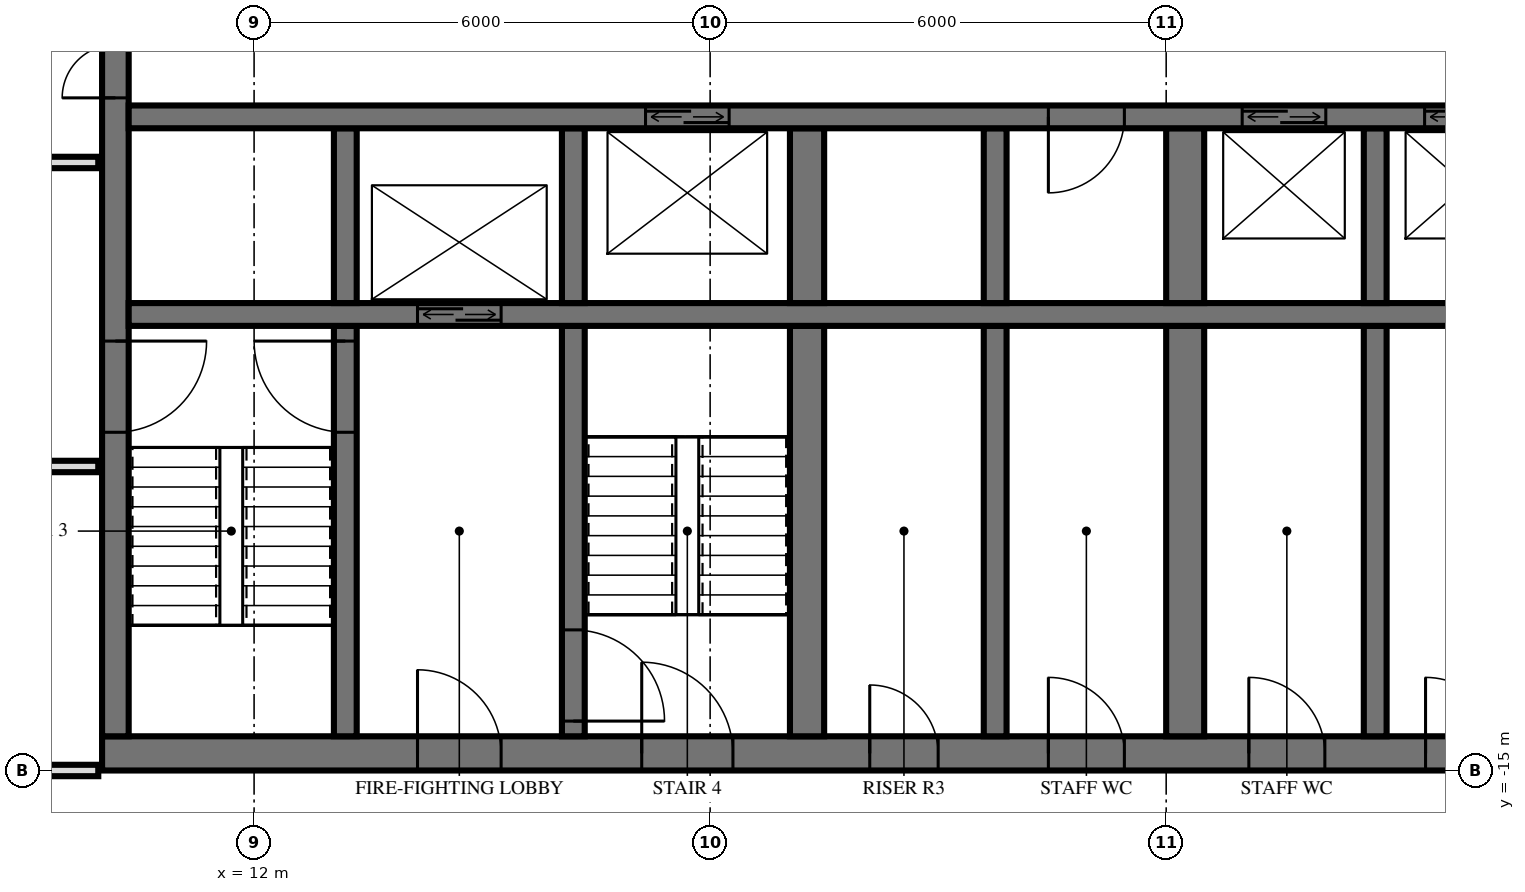
"""IFC4 building model, lengths in metres.
Left out: names, types, materials, properties, quantities, classifications, styles, units other than length and angle.
Written with IfcOpenShell. Run it as: python <this file> out.ifc"""

import sys

from ifc_helpers import new_model, si_unit, direction, frame, frame_2d, origin, place, context, subcontext, project, spatial, rectangle, extrude, element, fill, save


model = new_model("IFC4")
c1 = context("Model", 3, precision=1e-05, world=origin(), true_north=direction((0.0, 1.0)))
c2 = subcontext(c1, "Body", "Model", "MODEL_VIEW")
j1 = project(units=[si_unit("LENGTHUNIT", "METRE"), si_unit("PLANEANGLEUNIT", "RADIAN")], contexts=[c1])
p1 = place(None, origin())
s1 = spatial("IfcSite", under=j1, at=p1, CompositionType="ELEMENT")
p2 = place(p1, origin())
s2 = spatial("IfcBuilding", under=s1, at=p2, CompositionType="ELEMENT")
p3 = place(p2, frame((0.0, 0.0, 99.6)))
s3 = spatial("IfcBuildingStorey", under=s2, at=p3, CompositionType="ELEMENT", Elevation=99.6)
p4 = place(p3, frame((10.0, -14.775, 0.0), z_axis=(0.0, 0.0, 1.0), x_axis=(1.0, 0.0, 0.0)))
e1 = element("IfcWall", 1, at=p4, inside=s3, PredefinedType="SHEAR", context=c2, shape_type="SweptSolid", body=[
    extrude(rectangle(XDim=19.5, YDim=0.45, at=frame_2d((9.75, 0.0))), origin(), (0.0, 0.0, 1.0), 3.6),
])
p5 = place(p4, frame((7.1, 0.0, 0.0)))
e2 = element("IfcOpeningElement", 2, at=p5, cuts=e1, PredefinedType="OPENING", context=c2, shape_type="SweptSolid", body=[
    extrude(rectangle(XDim=1.2, YDim=2.1, at=frame_2d((0.6, 1.05))), frame((0.0, 0.235, 0.0), z_axis=(0.0, -1.0, 0.0), x_axis=(1.0, 0.0, 0.0)), (0.0, 0.0, 1.0), 0.47),
])
p6 = place(p4, frame((4.15, 0.0, 0.0)))
e3 = element("IfcOpeningElement", 3, at=p6, cuts=e1, PredefinedType="OPENING", context=c2, shape_type="SweptSolid", body=[
    extrude(rectangle(XDim=1.1, YDim=2.1, at=frame_2d((0.55, 1.05))), frame((0.0, 0.235, 0.0), z_axis=(0.0, -1.0, 0.0), x_axis=(1.0, 0.0, 0.0)), (0.0, 0.0, 1.0), 0.47),
])
p7 = place(p4, frame((10.1, 0.0, 0.0)))
e4 = element("IfcOpeningElement", 4, at=p7, cuts=e1, PredefinedType="OPENING", context=c2, shape_type="SweptSolid", body=[
    extrude(rectangle(XDim=0.9, YDim=2.1, at=frame_2d((0.45, 1.05))), frame((0.0, 0.235, 0.0), z_axis=(0.0, -1.0, 0.0), x_axis=(1.0, 0.0, 0.0)), (0.0, 0.0, 1.0), 0.47),
])
p8 = place(p4, frame((12.45, 0.0, 0.0)))
e5 = element("IfcOpeningElement", 5, at=p8, cuts=e1, PredefinedType="OPENING", context=c2, shape_type="SweptSolid", body=[
    extrude(rectangle(XDim=1.0, YDim=2.1, at=frame_2d((0.5, 1.05))), frame((0.0, 0.235, 0.0), z_axis=(0.0, -1.0, 0.0), x_axis=(1.0, 0.0, 0.0)), (0.0, 0.0, 1.0), 0.47),
])
p9 = place(p4, frame((15.087, 0.0, 0.0)))
e6 = element("IfcOpeningElement", 6, at=p9, cuts=e1, PredefinedType="OPENING", context=c2, shape_type="SweptSolid", body=[
    extrude(rectangle(XDim=1.0, YDim=2.1, at=frame_2d((0.5, 1.05))), frame((0.0, 0.235, 0.0), z_axis=(0.0, -1.0, 0.0), x_axis=(1.0, 0.0, 0.0)), (0.0, 0.0, 1.0), 0.47),
])
p10 = place(p4, frame((17.413, 0.0, 0.0)))
e7 = element("IfcOpeningElement", 7, at=p10, cuts=e1, PredefinedType="OPENING", context=c2, shape_type="SweptSolid", body=[
    extrude(rectangle(XDim=1.0, YDim=2.1, at=frame_2d((0.5, 1.05))), frame((0.0, 0.235, 0.0), z_axis=(0.0, -1.0, 0.0), x_axis=(1.0, 0.0, 0.0)), (0.0, 0.0, 1.0), 0.47),
])
p11 = place(p3, frame((10.175, -14.55, 0.0), z_axis=(0.0, 0.0, 1.0), x_axis=(0.0, 1.0, 0.0)))
e8 = element("IfcWall", 8, at=p11, inside=s3, PredefinedType="SHEAR", context=c2, shape_type="SweptSolid", body=[
    extrude(rectangle(XDim=14.1, YDim=0.35, at=frame_2d((7.05, 0.0))), origin(), (0.0, 0.0, 1.0), 3.6),
])
p12 = place(p11, frame((8.4, 0.0, 0.0)))
e9 = element("IfcOpeningElement", 9, at=p12, cuts=e8, PredefinedType="OPENING", context=c2, shape_type="SweptSolid", body=[
    extrude(rectangle(XDim=1.4, YDim=2.4, at=frame_2d((0.7, 1.2))), frame((0.0, 0.185, 0.0), z_axis=(0.0, -1.0, 0.0), x_axis=(1.0, 0.0, 0.0)), (0.0, 0.0, 1.0), 0.37),
])
p13 = place(p11, frame((10.0, 0.0, 0.0)))
e10 = element("IfcOpeningElement", 10, at=p13, cuts=e8, PredefinedType="OPENING", context=c2, shape_type="SweptSolid", body=[
    extrude(rectangle(XDim=1.4, YDim=2.4, at=frame_2d((0.7, 1.2))), frame((0.0, 0.185, 0.0), z_axis=(0.0, -1.0, 0.0), x_axis=(1.0, 0.0, 0.0)), (0.0, 0.0, 1.0), 0.37),
])
p14 = place(p11, frame((4.0, 0.0, 0.0)))
e11 = element("IfcOpeningElement", 11, at=p14, cuts=e8, PredefinedType="OPENING", context=c2, shape_type="SweptSolid", body=[
    extrude(rectangle(XDim=1.2, YDim=2.1, at=frame_2d((0.6, 1.05))), frame((0.0, 0.185, 0.0), z_axis=(0.0, -1.0, 0.0), x_axis=(1.0, 0.0, 0.0)), (0.0, 0.0, 1.0), 0.37),
])
p15 = place(p3, frame((10.35, -6.4, 0.0), z_axis=(0.0, 0.0, 1.0), x_axis=(1.0, 0.0, 0.0)))
e12 = element("IfcWall", 12, at=p15, inside=s3, PredefinedType="SHEAR", context=c2, shape_type="SweptSolid", body=[
    extrude(rectangle(XDim=18.7, YDim=0.3, at=frame_2d((9.35, 0.0))), origin(), (0.0, 0.0, 1.0), 3.6),
])
p16 = place(p15, frame((14.65, 0.0, 0.0)))
e13 = element("IfcOpeningElement", 13, at=p16, cuts=e12, PredefinedType="OPENING", context=c2, shape_type="SweptSolid", body=[
    extrude(rectangle(XDim=1.1, YDim=2.1, at=frame_2d((0.55, 1.05))), frame((0.0, 0.16, 0.0), z_axis=(0.0, -1.0, 0.0), x_axis=(1.0, 0.0, 0.0)), (0.0, 0.0, 1.0), 0.32),
])
p17 = place(p15, frame((17.05, 0.0, 0.0)))
e14 = element("IfcOpeningElement", 14, at=p17, cuts=e12, PredefinedType="OPENING", context=c2, shape_type="SweptSolid", body=[
    extrude(rectangle(XDim=1.1, YDim=2.1, at=frame_2d((0.55, 1.05))), frame((0.0, 0.16, 0.0), z_axis=(0.0, -1.0, 0.0), x_axis=(1.0, 0.0, 0.0)), (0.0, 0.0, 1.0), 0.32),
])
p18 = place(p15, frame((6.8, 0.0, 0.0)))
e15 = element("IfcOpeningElement", 15, at=p18, cuts=e12, PredefinedType="OPENING", context=c2, shape_type="SweptSolid", body=[
    extrude(rectangle(XDim=1.1, YDim=2.1, at=frame_2d((0.55, 1.05))), frame((0.0, 0.16, 0.0), z_axis=(0.0, -1.0, 0.0), x_axis=(1.0, 0.0, 0.0)), (0.0, 0.0, 1.0), 0.32),
])
p19 = place(p15, frame((12.1, 0.0, 0.0)))
e16 = element("IfcOpeningElement", 16, at=p19, cuts=e12, PredefinedType="OPENING", context=c2, shape_type="SweptSolid", body=[
    extrude(rectangle(XDim=1.0, YDim=2.1, at=frame_2d((0.5, 1.05))), frame((0.0, 0.16, 0.0), z_axis=(0.0, -1.0, 0.0), x_axis=(1.0, 0.0, 0.0)), (0.0, 0.0, 1.0), 0.32),
])
p20 = place(p3, frame((10.35, -9.0, 0.0), z_axis=(0.0, 0.0, 1.0), x_axis=(1.0, 0.0, 0.0)))
e17 = element("IfcWall", 17, at=p20, inside=s3, PredefinedType="SHEAR", context=c2, shape_type="SweptSolid", body=[
    extrude(rectangle(XDim=18.7, YDim=0.3, at=frame_2d((9.35, 0.0))), origin(), (0.0, 0.0, 1.0), 3.6),
])
p21 = place(p20, frame((3.8, 0.0, 0.0)))
e18 = element("IfcOpeningElement", 18, at=p21, cuts=e17, PredefinedType="OPENING", context=c2, shape_type="SweptSolid", body=[
    extrude(rectangle(XDim=1.1, YDim=2.1, at=frame_2d((0.55, 1.05))), frame((0.0, 0.16, 0.0), z_axis=(0.0, -1.0, 0.0), x_axis=(1.0, 0.0, 0.0)), (0.0, 0.0, 1.0), 0.32),
])
p22 = place(p3, frame((13.2, -8.85, 0.0), z_axis=(0.0, 0.0, 1.0), x_axis=(0.0, 1.0, 0.0)))
e19 = element("IfcWall", 19, at=p22, inside=s3, PredefinedType="SHEAR", context=c2, shape_type="SweptSolid", body=[
    extrude(rectangle(XDim=2.3, YDim=0.3, at=frame_2d((1.15, 0.0))), origin(), (0.0, 0.0, 1.0), 3.6),
])
p23 = place(p3, frame((13.2, -14.55, 0.0), z_axis=(0.0, 0.0, 1.0), x_axis=(0.0, 1.0, 0.0)))
e20 = element("IfcWall", 20, at=p23, inside=s3, PredefinedType="SHEAR", context=c2, shape_type="SweptSolid", body=[
    extrude(rectangle(XDim=5.4, YDim=0.3, at=frame_2d((2.7, 0.0))), origin(), (0.0, 0.0, 1.0), 3.6),
])
p24 = place(p23, frame((4.0, 0.0, 0.0)))
e21 = element("IfcOpeningElement", 21, at=p24, cuts=e20, PredefinedType="OPENING", context=c2, shape_type="SweptSolid", body=[
    extrude(rectangle(XDim=1.2, YDim=2.1, at=frame_2d((0.6, 1.05))), frame((0.0, 0.16, 0.0), z_axis=(0.0, -1.0, 0.0), x_axis=(1.0, 0.0, 0.0)), (0.0, 0.0, 1.0), 0.32),
])
p25 = place(p3, frame((16.2, -8.85, 0.0), z_axis=(0.0, 0.0, 1.0), x_axis=(0.0, 1.0, 0.0)))
e22 = element("IfcWall", 22, at=p25, inside=s3, PredefinedType="SHEAR", context=c2, shape_type="SweptSolid", body=[
    extrude(rectangle(XDim=2.3, YDim=0.3, at=frame_2d((1.15, 0.0))), origin(), (0.0, 0.0, 1.0), 3.6),
])
p26 = place(p3, frame((16.2, -14.55, 0.0), z_axis=(0.0, 0.0, 1.0), x_axis=(0.0, 1.0, 0.0)))
e23 = element("IfcWall", 23, at=p26, inside=s3, PredefinedType="SHEAR", context=c2, shape_type="SweptSolid", body=[
    extrude(rectangle(XDim=5.4, YDim=0.3, at=frame_2d((2.7, 0.0))), origin(), (0.0, 0.0, 1.0), 3.6),
])
p27 = place(p26, frame((0.2, 0.0, 0.0)))
e24 = element("IfcOpeningElement", 24, at=p27, cuts=e23, PredefinedType="OPENING", context=c2, shape_type="SweptSolid", body=[
    extrude(rectangle(XDim=1.2, YDim=2.1, at=frame_2d((0.6, 1.05))), frame((0.0, 0.16, 0.0), z_axis=(0.0, -1.0, 0.0), x_axis=(1.0, 0.0, 0.0)), (0.0, 0.0, 1.0), 0.32),
])
p28 = place(p3, frame((19.275, -8.85, 0.0), z_axis=(0.0, 0.0, 1.0), x_axis=(0.0, 1.0, 0.0)))
e25 = element("IfcWall", 25, at=p28, inside=s3, PredefinedType="SHEAR", context=c2, shape_type="SweptSolid", body=[
    extrude(rectangle(XDim=2.3, YDim=0.45, at=frame_2d((1.15, 0.0))), origin(), (0.0, 0.0, 1.0), 3.6),
])
p29 = place(p3, frame((19.275, -14.55, 0.0), z_axis=(0.0, 0.0, 1.0), x_axis=(0.0, 1.0, 0.0)))
e26 = element("IfcWall", 26, at=p29, inside=s3, PredefinedType="SHEAR", context=c2, shape_type="SweptSolid", body=[
    extrude(rectangle(XDim=5.4, YDim=0.45, at=frame_2d((2.7, 0.0))), origin(), (0.0, 0.0, 1.0), 3.6),
])
p30 = place(p3, frame((21.75, -8.85, 0.0), z_axis=(0.0, 0.0, 1.0), x_axis=(0.0, 1.0, 0.0)))
e27 = element("IfcWall", 27, at=p30, inside=s3, PredefinedType="SHEAR", context=c2, shape_type="SweptSolid", body=[
    extrude(rectangle(XDim=2.3, YDim=0.3, at=frame_2d((1.15, 0.0))), origin(), (0.0, 0.0, 1.0), 3.6),
])
p31 = place(p3, frame((21.75, -14.55, 0.0), z_axis=(0.0, 0.0, 1.0), x_axis=(0.0, 1.0, 0.0)))
e28 = element("IfcWall", 28, at=p31, inside=s3, PredefinedType="SHEAR", context=c2, shape_type="SweptSolid", body=[
    extrude(rectangle(XDim=5.4, YDim=0.3, at=frame_2d((2.7, 0.0))), origin(), (0.0, 0.0, 1.0), 3.6),
])
p32 = place(p3, frame((24.25, -8.85, 0.0), z_axis=(0.0, 0.0, 1.0), x_axis=(0.0, 1.0, 0.0)))
e29 = element("IfcWall", 29, at=p32, inside=s3, PredefinedType="SHEAR", context=c2, shape_type="SweptSolid", body=[
    extrude(rectangle(XDim=2.3, YDim=0.5, at=frame_2d((1.15, 0.0))), origin(), (0.0, 0.0, 1.0), 3.6),
])
p33 = place(p3, frame((24.25, -14.55, 0.0), z_axis=(0.0, 0.0, 1.0), x_axis=(0.0, 1.0, 0.0)))
e30 = element("IfcWall", 30, at=p33, inside=s3, PredefinedType="SHEAR", context=c2, shape_type="SweptSolid", body=[
    extrude(rectangle(XDim=5.4, YDim=0.5, at=frame_2d((2.7, 0.0))), origin(), (0.0, 0.0, 1.0), 3.6),
])
p34 = place(p3, frame((26.75, -8.85, 0.0), z_axis=(0.0, 0.0, 1.0), x_axis=(0.0, 1.0, 0.0)))
e31 = element("IfcWall", 31, at=p34, inside=s3, PredefinedType="SHEAR", context=c2, shape_type="SweptSolid", body=[
    extrude(rectangle(XDim=2.3, YDim=0.3, at=frame_2d((1.15, 0.0))), origin(), (0.0, 0.0, 1.0), 3.6),
])
p35 = place(p3, frame((26.75, -14.55, 0.0), z_axis=(0.0, 0.0, 1.0), x_axis=(0.0, 1.0, 0.0)))
e32 = element("IfcWall", 32, at=p35, inside=s3, PredefinedType="SHEAR", context=c2, shape_type="SweptSolid", body=[
    extrude(rectangle(XDim=5.4, YDim=0.3, at=frame_2d((2.7, 0.0))), origin(), (0.0, 0.0, 1.0), 3.6),
])
p36 = place(p3, frame((-9.95, -15.0, 0.0), z_axis=(0.0, 0.0, 1.0), x_axis=(1.0, 0.0, 0.0)))
e33 = element("IfcWall", 33, at=p36, inside=s3, PredefinedType="PARTITIONING", context=c2, shape_type="SweptSolid", body=[
    extrude(rectangle(XDim=19.9, YDim=0.15, at=frame_2d((9.95, 0.0))), origin(), (0.0, 0.0, 1.0), 2.684),
])
p37 = place(p36, frame((9.45, 0.0, 0.0)))
e34 = element("IfcOpeningElement", 34, at=p37, cuts=e33, PredefinedType="OPENING", context=c2, shape_type="SweptSolid", body=[
    extrude(rectangle(XDim=1.0, YDim=2.1, at=frame_2d((0.5, 1.05))), frame((0.0, 0.085, 0.0), z_axis=(0.0, -1.0, 0.0), x_axis=(1.0, 0.0, 0.0)), (0.0, 0.0, 1.0), 0.17),
])
p38 = place(p3, frame((-9.95, -11.0, 0.0), z_axis=(0.0, 0.0, 1.0), x_axis=(1.0, 0.0, 0.0)))
e35 = element("IfcWall", 35, at=p38, inside=s3, PredefinedType="PARTITIONING", context=c2, shape_type="SweptSolid", body=[
    extrude(rectangle(XDim=19.9, YDim=0.15, at=frame_2d((9.95, 0.0))), origin(), (0.0, 0.0, 1.0), 3.32),
])
p39 = place(p38, frame((9.45, 0.0, 0.0)))
e36 = element("IfcOpeningElement", 36, at=p39, cuts=e35, PredefinedType="OPENING", context=c2, shape_type="SweptSolid", body=[
    extrude(rectangle(XDim=1.0, YDim=2.1, at=frame_2d((0.5, 1.05))), frame((0.0, 0.085, 0.0), z_axis=(0.0, -1.0, 0.0), x_axis=(1.0, 0.0, 0.0)), (0.0, 0.0, 1.0), 0.17),
])
p40 = place(p38, frame((3.45, 0.0, 0.0)))
e37 = element("IfcOpeningElement", 37, at=p40, cuts=e35, PredefinedType="OPENING", context=c2, shape_type="SweptSolid", body=[
    extrude(rectangle(XDim=1.0, YDim=2.1, at=frame_2d((0.5, 1.05))), frame((0.0, 0.085, 0.0), z_axis=(0.0, -1.0, 0.0), x_axis=(1.0, 0.0, 0.0)), (0.0, 0.0, 1.0), 0.17),
])
p41 = place(p3, frame((-9.95, -7.0, 0.0), z_axis=(0.0, 0.0, 1.0), x_axis=(1.0, 0.0, 0.0)))
e38 = element("IfcWall", 38, at=p41, inside=s3, PredefinedType="PARTITIONING", context=c2, shape_type="SweptSolid", body=[
    extrude(rectangle(XDim=19.9, YDim=0.15, at=frame_2d((9.95, 0.0))), origin(), (0.0, 0.0, 1.0), 3.32),
])
p42 = place(p41, frame((9.45, 0.0, 0.0)))
e39 = element("IfcOpeningElement", 39, at=p42, cuts=e38, PredefinedType="OPENING", context=c2, shape_type="SweptSolid", body=[
    extrude(rectangle(XDim=1.0, YDim=2.1, at=frame_2d((0.5, 1.05))), frame((0.0, 0.085, 0.0), z_axis=(0.0, -1.0, 0.0), x_axis=(1.0, 0.0, 0.0)), (0.0, 0.0, 1.0), 0.17),
])
p43 = place(p41, frame((15.45, 0.0, 0.0)))
e40 = element("IfcOpeningElement", 40, at=p43, cuts=e38, PredefinedType="OPENING", context=c2, shape_type="SweptSolid", body=[
    extrude(rectangle(XDim=1.0, YDim=2.1, at=frame_2d((0.5, 1.05))), frame((0.0, 0.085, 0.0), z_axis=(0.0, -1.0, 0.0), x_axis=(1.0, 0.0, 0.0)), (0.0, 0.0, 1.0), 0.17),
])
p44 = place(p16, origin())
e41 = element("IfcDoor", 41, at=p44, inside=s3, OperationType="DOUBLE_DOOR_SLIDING", PredefinedType="USERDEFINED", context=c2, shape_type="SweptSolid", body=[
    extrude(rectangle(XDim=1.1, YDim=2.1, at=frame_2d((0.55, 1.05))), frame((0.0, 0.025, 0.0), z_axis=(0.0, -1.0, 0.0), x_axis=(1.0, 0.0, 0.0)), (0.0, 0.0, 1.0), 0.05),
])
fill(e13, e41)
p45 = place(p17, origin())
e42 = element("IfcDoor", 42, at=p45, inside=s3, OperationType="DOUBLE_DOOR_SLIDING", PredefinedType="USERDEFINED", context=c2, shape_type="SweptSolid", body=[
    extrude(rectangle(XDim=1.1, YDim=2.1, at=frame_2d((0.55, 1.05))), frame((0.0, 0.025, 0.0), z_axis=(0.0, -1.0, 0.0), x_axis=(1.0, 0.0, 0.0)), (0.0, 0.0, 1.0), 0.05),
])
fill(e14, e42)
p46 = place(p21, origin())
e43 = element("IfcDoor", 43, at=p46, inside=s3, OperationType="DOUBLE_DOOR_SLIDING", PredefinedType="USERDEFINED", context=c2, shape_type="SweptSolid", body=[
    extrude(rectangle(XDim=1.1, YDim=2.1, at=frame_2d((0.55, 1.05))), frame((0.0, 0.025, 0.0), z_axis=(0.0, -1.0, 0.0), x_axis=(1.0, 0.0, 0.0)), (0.0, 0.0, 1.0), 0.05),
])
fill(e18, e43)
p47 = place(p18, origin())
e44 = element("IfcDoor", 44, at=p47, inside=s3, OperationType="DOUBLE_DOOR_SLIDING", PredefinedType="USERDEFINED", context=c2, shape_type="SweptSolid", body=[
    extrude(rectangle(XDim=1.1, YDim=2.1, at=frame_2d((0.55, 1.05))), frame((0.0, 0.025, 0.0), z_axis=(0.0, -1.0, 0.0), x_axis=(1.0, 0.0, 0.0)), (0.0, 0.0, 1.0), 0.05),
])
fill(e15, e44)
p48 = place(p12, origin())
e45 = element("IfcDoor", 45, at=p48, inside=s3, OperationType="DOUBLE_DOOR_SINGLE_SWING", PredefinedType="DOOR", context=c2, shape_type="SweptSolid", body=[
    extrude(rectangle(XDim=1.4, YDim=2.4, at=frame_2d((0.7, 1.2))), frame((0.0, 0.025, 0.0), z_axis=(0.0, -1.0, 0.0), x_axis=(1.0, 0.0, 0.0)), (0.0, 0.0, 1.0), 0.05),
])
fill(e9, e45)
p49 = place(p14, frame((0.6, 0.0, 0.0), z_axis=(0.0, 0.0, 1.0), x_axis=(-1.0, 0.0, 0.0)))
e46 = element("IfcDoor", 46, at=p49, inside=s3, OperationType="SINGLE_SWING_RIGHT", PredefinedType="DOOR", context=c2, shape_type="SweptSolid", body=[
    extrude(rectangle(XDim=1.2, YDim=2.1, at=frame_2d((0.0, 1.05))), frame((0.0, -0.025, 0.0), z_axis=(0.0, 1.0, 0.0), x_axis=(-1.0, 0.0, 0.0)), (0.0, 0.0, 1.0), 0.05),
])
fill(e11, e46)
p50 = place(p5, origin())
e47 = element("IfcDoor", 47, at=p50, inside=s3, OperationType="SINGLE_SWING_RIGHT", PredefinedType="DOOR", context=c2, shape_type="SweptSolid", body=[
    extrude(rectangle(XDim=1.2, YDim=2.1, at=frame_2d((0.6, 1.05))), frame((0.0, 0.025, 0.0), z_axis=(0.0, -1.0, 0.0), x_axis=(1.0, 0.0, 0.0)), (0.0, 0.0, 1.0), 0.05),
])
fill(e2, e47)
p51 = place(p6, origin())
e48 = element("IfcDoor", 48, at=p51, inside=s3, OperationType="SINGLE_SWING_RIGHT", PredefinedType="DOOR", context=c2, shape_type="SweptSolid", body=[
    extrude(rectangle(XDim=1.1, YDim=2.1, at=frame_2d((0.55, 1.05))), frame((0.0, 0.025, 0.0), z_axis=(0.0, -1.0, 0.0), x_axis=(1.0, 0.0, 0.0)), (0.0, 0.0, 1.0), 0.05),
])
fill(e3, e48)
p52 = place(p7, origin())
e49 = element("IfcDoor", 49, at=p52, inside=s3, OperationType="SINGLE_SWING_RIGHT", PredefinedType="DOOR", context=c2, shape_type="SweptSolid", body=[
    extrude(rectangle(XDim=0.9, YDim=2.1, at=frame_2d((0.45, 1.05))), frame((0.0, 0.025, 0.0), z_axis=(0.0, -1.0, 0.0), x_axis=(1.0, 0.0, 0.0)), (0.0, 0.0, 1.0), 0.05),
])
fill(e4, e49)
p53 = place(p8, origin())
e50 = element("IfcDoor", 50, at=p53, inside=s3, OperationType="SINGLE_SWING_RIGHT", PredefinedType="DOOR", context=c2, shape_type="SweptSolid", body=[
    extrude(rectangle(XDim=1.0, YDim=2.1, at=frame_2d((0.5, 1.05))), frame((0.0, 0.025, 0.0), z_axis=(0.0, -1.0, 0.0), x_axis=(1.0, 0.0, 0.0)), (0.0, 0.0, 1.0), 0.05),
])
fill(e5, e50)
p54 = place(p9, origin())
e51 = element("IfcDoor", 51, at=p54, inside=s3, OperationType="SINGLE_SWING_RIGHT", PredefinedType="DOOR", context=c2, shape_type="SweptSolid", body=[
    extrude(rectangle(XDim=1.0, YDim=2.1, at=frame_2d((0.5, 1.05))), frame((0.0, 0.025, 0.0), z_axis=(0.0, -1.0, 0.0), x_axis=(1.0, 0.0, 0.0)), (0.0, 0.0, 1.0), 0.05),
])
fill(e6, e51)
p55 = place(p10, origin())
e52 = element("IfcDoor", 52, at=p55, inside=s3, OperationType="SINGLE_SWING_RIGHT", PredefinedType="DOOR", context=c2, shape_type="SweptSolid", body=[
    extrude(rectangle(XDim=1.0, YDim=2.1, at=frame_2d((0.5, 1.05))), frame((0.0, 0.025, 0.0), z_axis=(0.0, -1.0, 0.0), x_axis=(1.0, 0.0, 0.0)), (0.0, 0.0, 1.0), 0.05),
])
fill(e7, e52)
p56 = place(p19, frame((0.5, 0.0, 0.0), z_axis=(0.0, 0.0, 1.0), x_axis=(-1.0, 0.0, 0.0)))
e53 = element("IfcDoor", 53, at=p56, inside=s3, OperationType="SINGLE_SWING_LEFT", PredefinedType="DOOR", context=c2, shape_type="SweptSolid", body=[
    extrude(rectangle(XDim=1.0, YDim=2.1, at=frame_2d((0.0, 1.05))), frame((0.0, -0.025, 0.0), z_axis=(0.0, 1.0, 0.0), x_axis=(-1.0, 0.0, 0.0)), (0.0, 0.0, 1.0), 0.05),
])
fill(e16, e53)
p57 = place(p24, origin())
e54 = element("IfcDoor", 54, at=p57, inside=s3, OperationType="SINGLE_SWING_LEFT", PredefinedType="DOOR", context=c2, shape_type="SweptSolid", body=[
    extrude(rectangle(XDim=1.2, YDim=2.1, at=frame_2d((0.6, 1.05))), frame((0.0, 0.025, 0.0), z_axis=(0.0, -1.0, 0.0), x_axis=(1.0, 0.0, 0.0)), (0.0, 0.0, 1.0), 0.05),
])
fill(e21, e54)
p58 = place(p27, frame((0.6, 0.0, 0.0), z_axis=(0.0, 0.0, 1.0), x_axis=(-1.0, 0.0, 0.0)))
e55 = element("IfcDoor", 55, at=p58, inside=s3, OperationType="SINGLE_SWING_LEFT", PredefinedType="DOOR", context=c2, shape_type="SweptSolid", body=[
    extrude(rectangle(XDim=1.2, YDim=2.1, at=frame_2d((0.0, 1.05))), frame((0.0, -0.025, 0.0), z_axis=(0.0, 1.0, 0.0), x_axis=(-1.0, 0.0, 0.0)), (0.0, 0.0, 1.0), 0.05),
])
fill(e24, e55)
save(model, sys.argv[1])
